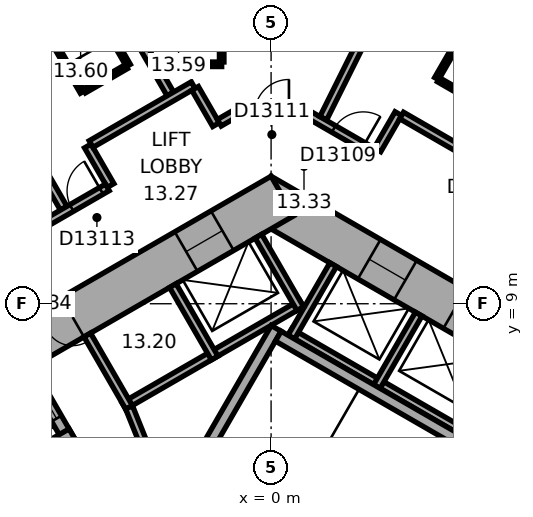
"""IFC4 building model, lengths in metres.
Left out: names, types, materials, properties, quantities, classifications, styles, units other than length and angle.
Written with IfcOpenShell. Run it as: python <this file> out.ifc"""

import sys

from ifc_helpers import new_model, si_unit, direction, frame, frame_2d, origin, place, context, subcontext, project, spatial, rectangle, extrude, element, fill, save


model = new_model("IFC4")
c1 = context("Model", 3, precision=1e-05, world=origin(), true_north=direction((0.0, 1.0)))
c2 = subcontext(c1, "Body", "Model", "MODEL_VIEW")
j1 = project(units=[si_unit("LENGTHUNIT", "METRE"), si_unit("PLANEANGLEUNIT", "RADIAN")], contexts=[c1])
p1 = place(None, origin())
s1 = spatial("IfcSite", under=j1, at=p1, CompositionType="ELEMENT")
p2 = place(p1, origin())
s2 = spatial("IfcBuilding", under=s1, at=p2, CompositionType="ELEMENT")
p3 = place(p2, frame((0.0, 0.0, 63.8)))
s3 = spatial("IfcBuildingStorey", under=s2, at=p3, CompositionType="ELEMENT", Elevation=63.8)
p4 = place(p3, frame((10.4, 5.658, 0.0), z_axis=(0.0, 0.0, 1.0), x_axis=(-0.866021384402, 0.500006961711, 0.0)))
e1 = element("IfcWall", 1, at=p4, inside=s3, PredefinedType="SHEAR", context=c2, shape_type="SweptSolid", body=[
    extrude(rectangle(XDim=12.355, YDim=1.2, at=frame_2d((6.178, 0.0))), origin(), (0.0, 0.0, 1.0), 3.3),
])
p5 = place(p4, frame((2.728, 0.0, 0.0)))
e2 = element("IfcOpeningElement", 2, at=p5, cuts=e1, PredefinedType="OPENING", context=c2, shape_type="SweptSolid", body=[
    extrude(rectangle(XDim=1.1, YDim=2.1, at=frame_2d((0.55, 1.05))), frame((0.0, 0.61, 0.0), z_axis=(0.0, -1.0, 0.0), x_axis=(1.0, 0.0, 0.0)), (0.0, 0.0, 1.0), 1.22),
])
p6 = place(p4, frame((5.328, 0.0, 0.0)))
e3 = element("IfcOpeningElement", 3, at=p6, cuts=e1, PredefinedType="OPENING", context=c2, shape_type="SweptSolid", body=[
    extrude(rectangle(XDim=1.1, YDim=2.1, at=frame_2d((0.55, 1.05))), frame((0.0, 0.61, 0.0), z_axis=(0.0, -1.0, 0.0), x_axis=(1.0, 0.0, 0.0)), (0.0, 0.0, 1.0), 1.22),
])
p7 = place(p4, frame((7.928, 0.0, 0.0)))
e4 = element("IfcOpeningElement", 4, at=p7, cuts=e1, PredefinedType="OPENING", context=c2, shape_type="SweptSolid", body=[
    extrude(rectangle(XDim=1.1, YDim=2.1, at=frame_2d((0.55, 1.05))), frame((0.0, 0.61, 0.0), z_axis=(0.0, -1.0, 0.0), x_axis=(1.0, 0.0, 0.0)), (0.0, 0.0, 1.0), 1.22),
])
p8 = place(p3, frame((0.3, 11.836, 0.0), z_axis=(0.0, 0.0, 1.0), x_axis=(-0.866021384402, -0.500006961711, 0.0)))
e5 = element("IfcWall", 5, at=p8, inside=s3, PredefinedType="SHEAR", context=c2, shape_type="SweptSolid", body=[
    extrude(rectangle(XDim=12.355, YDim=1.2, at=frame_2d((6.178, 0.0))), origin(), (0.0, 0.0, 1.0), 3.3),
])
p9 = place(p8, frame((6.378, 0.0, 0.0)))
e6 = element("IfcOpeningElement", 6, at=p9, cuts=e5, PredefinedType="OPENING", context=c2, shape_type="SweptSolid", body=[
    extrude(rectangle(XDim=1.5, YDim=2.1, at=frame_2d((0.75, 1.05))), frame((0.0, 0.61, 0.0), z_axis=(0.0, -1.0, 0.0), x_axis=(1.0, 0.0, 0.0)), (0.0, 0.0, 1.0), 1.22),
])
p10 = place(p8, frame((1.828, 0.0, 0.0)))
e7 = element("IfcOpeningElement", 7, at=p10, cuts=e5, PredefinedType="OPENING", context=c2, shape_type="SweptSolid", body=[
    extrude(rectangle(XDim=1.1, YDim=2.1, at=frame_2d((0.55, 1.05))), frame((0.0, 0.61, 0.0), z_axis=(0.0, -1.0, 0.0), x_axis=(1.0, 0.0, 0.0)), (0.0, 0.0, 1.0), 1.22),
])
p11 = place(p3, frame((20.63, 15.47, 0.0), z_axis=(0.0, 0.0, 1.0), x_axis=(-0.894934518609, 0.446197498203, 0.0)))
e8 = element("IfcWall", 8, at=p11, inside=s3, PredefinedType="STANDARD", context=c2, shape_type="SweptSolid", body=[
    extrude(rectangle(XDim=21.246, YDim=0.2, at=frame_2d((10.623, 0.0))), origin(), (0.0, 0.0, 1.0), 3.3),
])
p12 = place(p11, frame((1.553, 0.0, 0.8)))
e9 = element("IfcOpeningElement", 9, at=p12, cuts=e8, PredefinedType="OPENING", context=c2, shape_type="SweptSolid", body=[
    extrude(rectangle(XDim=2.4, YDim=1.7, at=frame_2d((1.2, 0.85))), frame((0.0, 0.11, 0.0), z_axis=(0.0, -1.0, 0.0), x_axis=(1.0, 0.0, 0.0)), (0.0, 0.0, 1.0), 0.22),
])
p13 = place(p11, frame((5.488, 0.0, 0.8)))
e10 = element("IfcOpeningElement", 10, at=p13, cuts=e8, PredefinedType="OPENING", context=c2, shape_type="SweptSolid", body=[
    extrude(rectangle(XDim=2.4, YDim=1.7, at=frame_2d((1.2, 0.85))), frame((0.0, 0.11, 0.0), z_axis=(0.0, -1.0, 0.0), x_axis=(1.0, 0.0, 0.0)), (0.0, 0.0, 1.0), 0.22),
])
p14 = place(p11, frame((9.422, 0.0, 0.8)))
e11 = element("IfcOpeningElement", 11, at=p14, cuts=e8, PredefinedType="OPENING", context=c2, shape_type="SweptSolid", body=[
    extrude(rectangle(XDim=2.4, YDim=1.7, at=frame_2d((1.2, 0.85))), frame((0.0, 0.11, 0.0), z_axis=(0.0, -1.0, 0.0), x_axis=(1.0, 0.0, 0.0)), (0.0, 0.0, 1.0), 0.22),
])
p15 = place(p11, frame((13.357, 0.0, 0.8)))
e12 = element("IfcOpeningElement", 12, at=p15, cuts=e8, PredefinedType="OPENING", context=c2, shape_type="SweptSolid", body=[
    extrude(rectangle(XDim=2.4, YDim=1.7, at=frame_2d((1.2, 0.85))), frame((0.0, 0.11, 0.0), z_axis=(0.0, -1.0, 0.0), x_axis=(1.0, 0.0, 0.0)), (0.0, 0.0, 1.0), 0.22),
])
p16 = place(p11, frame((17.292, 0.0, 0.8)))
e13 = element("IfcOpeningElement", 13, at=p16, cuts=e8, PredefinedType="OPENING", context=c2, shape_type="SweptSolid", body=[
    extrude(rectangle(XDim=2.4, YDim=1.7, at=frame_2d((1.2, 0.85))), frame((0.0, 0.11, 0.0), z_axis=(0.0, -1.0, 0.0), x_axis=(1.0, 0.0, 0.0)), (0.0, 0.0, 1.0), 0.22),
])
p17 = place(p3, frame((-3.136, 24.805, 0.0), z_axis=(0.0, 0.0, 1.0), x_axis=(-0.866028291626, -0.499994998079, 0.0)))
e14 = element("IfcWall", 14, at=p17, inside=s3, PredefinedType="STANDARD", context=c2, shape_type="SweptSolid", body=[
    extrude(rectangle(XDim=21.246, YDim=0.2, at=frame_2d((10.623, 0.0))), origin(), (0.0, 0.0, 1.0), 3.3),
])
p18 = place(p17, frame((1.555, 0.0, 0.8)))
e15 = element("IfcOpeningElement", 15, at=p18, cuts=e14, PredefinedType="OPENING", context=c2, shape_type="SweptSolid", body=[
    extrude(rectangle(XDim=2.4, YDim=1.7, at=frame_2d((1.2, 0.85))), frame((0.0, 0.11, 0.0), z_axis=(0.0, -1.0, 0.0), x_axis=(1.0, 0.0, 0.0)), (0.0, 0.0, 1.0), 0.22),
])
p19 = place(p17, frame((5.489, 0.0, 0.8)))
e16 = element("IfcOpeningElement", 16, at=p19, cuts=e14, PredefinedType="OPENING", context=c2, shape_type="SweptSolid", body=[
    extrude(rectangle(XDim=2.4, YDim=1.7, at=frame_2d((1.2, 0.85))), frame((0.0, 0.11, 0.0), z_axis=(0.0, -1.0, 0.0), x_axis=(1.0, 0.0, 0.0)), (0.0, 0.0, 1.0), 0.22),
])
p20 = place(p17, frame((9.424, 0.0, 0.8)))
e17 = element("IfcOpeningElement", 17, at=p20, cuts=e14, PredefinedType="OPENING", context=c2, shape_type="SweptSolid", body=[
    extrude(rectangle(XDim=2.4, YDim=1.7, at=frame_2d((1.2, 0.85))), frame((0.0, 0.11, 0.0), z_axis=(0.0, -1.0, 0.0), x_axis=(1.0, 0.0, 0.0)), (0.0, 0.0, 1.0), 0.22),
])
p21 = place(p17, frame((13.358, 0.0, 0.8)))
e18 = element("IfcOpeningElement", 18, at=p21, cuts=e14, PredefinedType="OPENING", context=c2, shape_type="SweptSolid", body=[
    extrude(rectangle(XDim=2.4, YDim=1.7, at=frame_2d((1.2, 0.85))), frame((0.0, 0.11, 0.0), z_axis=(0.0, -1.0, 0.0), x_axis=(1.0, 0.0, 0.0)), (0.0, 0.0, 1.0), 0.22),
])
p22 = place(p17, frame((17.293, 0.0, 0.8)))
e19 = element("IfcOpeningElement", 19, at=p22, cuts=e14, PredefinedType="OPENING", context=c2, shape_type="SweptSolid", body=[
    extrude(rectangle(XDim=2.4, YDim=1.7, at=frame_2d((1.2, 0.85))), frame((0.0, 0.11, 0.0), z_axis=(0.0, -1.0, 0.0), x_axis=(1.0, 0.0, 0.0)), (0.0, 0.0, 1.0), 0.22),
])
p23 = place(p3, frame((7.424, 4.259, 0.0), z_axis=(0.0, 0.0, 1.0), x_axis=(-0.866026010844, 0.49999894854, 0.0)))
e20 = element("IfcWall", 20, at=p23, inside=s3, PredefinedType="PARTITIONING", context=c2, shape_type="SweptSolid", body=[
    extrude(rectangle(XDim=8.0, YDim=0.2, at=frame_2d((4.0, 0.0))), origin(), (0.0, 0.0, 1.0), 3.05),
])
for number, where, z_axis, x_axis in (
    (21, (2.784, 6.822, 0.0), (0.0, 0.0, 1.0), (0.5, 0.866, 0.0)),
    (22, (0.532, 8.122, 0.0), (0.0, 0.0, 1.0), (0.5, 0.866, 0.0)),
):
    element("IfcWall", number, at=place(p3, frame(where, z_axis=z_axis, x_axis=x_axis)), inside=s3, PredefinedType="PARTITIONING", context=c2, shape_type="SweptSolid", body=[
        extrude(rectangle(XDim=2.2, YDim=0.2, at=frame_2d((1.1, 0.0))), origin(), (0.0, 0.0, 1.0), 3.05),
    ])
p24 = place(p3, frame((0.803, 9.009, 0.0), z_axis=(0.0, 0.0, 1.0), x_axis=(-0.866028230842, -0.499995103361, 0.0)))
e23 = element("IfcWall", 23, at=p24, inside=s3, PredefinedType="PARTITIONING", context=c2, shape_type="SweptSolid", body=[
    extrude(rectangle(XDim=5.4, YDim=0.2, at=frame_2d((2.7, 0.0))), origin(), (0.0, 0.0, 1.0), 3.05),
])
p25 = place(p3, frame((0.767, 8.872, 0.0), z_axis=(0.0, 0.0, 1.0), x_axis=(-0.499994660107, 0.866028486751, 0.0)))
e24 = element("IfcWall", 24, at=p25, inside=s3, PredefinedType="PARTITIONING", context=c2, shape_type="SweptSolid", body=[
    extrude(rectangle(XDim=2.2, YDim=0.2, at=frame_2d((1.1, 0.0))), origin(), (0.0, 0.0, 1.0), 3.05),
])
for number, where, z_axis, x_axis in (
    (25, (-1.485, 7.572, 0.0), (0.0, 0.0, 1.0), (-0.5, 0.866, 0.0)),
    (26, (-3.737, 6.272, 0.0), (0.0, 0.0, 1.0), (-0.5, 0.866, 0.0)),
):
    element("IfcWall", number, at=place(p3, frame(where, z_axis=z_axis, x_axis=x_axis)), inside=s3, PredefinedType="PARTITIONING", context=c2, shape_type="SweptSolid", body=[
        extrude(rectangle(XDim=2.2, YDim=0.2, at=frame_2d((1.1, 0.0))), origin(), (0.0, 0.0, 1.0), 3.05),
    ])
p26 = place(p3, frame((-2.216, 4.282, 0.0), z_axis=(0.0, 0.0, 1.0), x_axis=(0.499977259774, 0.866038532462, 0.0)))
e27 = element("IfcWall", 27, at=p26, inside=s3, PredefinedType="SHEAR", context=c2, shape_type="SweptSolid", body=[
    extrude(rectangle(XDim=4.7, YDim=0.3, at=frame_2d((2.35, 0.0))), origin(), (0.0, 0.0, 1.0), 3.05),
])
p27 = place(p3, frame((6.303, 4.617, 0.0), z_axis=(0.0, 0.0, 1.0), x_axis=(-0.866027801685, 0.499995846692, 0.0)))
e28 = element("IfcWall", 28, at=p27, inside=s3, PredefinedType="SHEAR", context=c2, shape_type="SweptSolid", body=[
    extrude(rectangle(XDim=7.06, YDim=0.3, at=frame_2d((3.53, 0.0))), origin(), (0.0, 0.0, 1.0), 3.05),
])
p28 = place(p3, frame((-5.295, 5.372, 0.0), z_axis=(0.0, 0.0, 1.0), x_axis=(-0.500077893725, 0.86598042715, 0.0)))
e29 = element("IfcWall", 29, at=p28, inside=s3, PredefinedType="SHEAR", context=c2, shape_type="SweptSolid", body=[
    extrude(rectangle(XDim=2.2, YDim=0.3, at=frame_2d((1.1, 0.0))), origin(), (0.0, 0.0, 1.0), 3.05),
])
p29 = place(p28, frame((0.7, 0.0, 0.0)))
e30 = element("IfcOpeningElement", 30, at=p29, cuts=e29, PredefinedType="OPENING", context=c2, shape_type="SweptSolid", body=[
    extrude(rectangle(XDim=1.1, YDim=2.1, at=frame_2d((0.55, 1.05))), frame((0.0, 0.16, 0.0), z_axis=(0.0, -1.0, 0.0), x_axis=(1.0, 0.0, 0.0)), (0.0, 0.0, 1.0), 0.32),
])
p30 = place(p3, frame((-5.24, 5.577, 0.0), z_axis=(0.0, 0.0, 1.0), x_axis=(-0.866014461049, -0.500018952895, 0.0)))
e31 = element("IfcWall", 31, at=p30, inside=s3, PredefinedType="SHEAR", context=c2, shape_type="SweptSolid", body=[
    extrude(rectangle(XDim=3.35, YDim=0.3, at=frame_2d((1.675, 0.0))), origin(), (0.0, 0.0, 1.0), 3.05),
])
p31 = place(p3, frame((-2.615, 3.487, 0.0), z_axis=(0.0, 0.0, 1.0), x_axis=(-0.373576831041, 0.92759924068, 0.0)))
e32 = element("IfcWall", 32, at=p31, inside=s3, PredefinedType="PARTITIONING", context=c2, shape_type="SweptSolid", body=[
    extrude(rectangle(XDim=3.002, YDim=0.2, at=frame_2d((1.501, 0.0))), origin(), (0.0, 0.0, 1.0), 3.05),
])
p32 = place(p31, frame((1.15, 0.0, 0.0)))
e33 = element("IfcOpeningElement", 33, at=p32, cuts=e32, PredefinedType="OPENING", context=c2, shape_type="SweptSolid", body=[
    extrude(rectangle(XDim=0.9, YDim=2.1, at=frame_2d((0.45, 1.05))), frame((0.0, 0.11, 0.0), z_axis=(0.0, -1.0, 0.0), x_axis=(1.0, 0.0, 0.0)), (0.0, 0.0, 1.0), 0.22),
])
p33 = place(p3, frame((-10.083, 19.524, 0.0), z_axis=(0.0, 0.0, 1.0), x_axis=(0.499999662836, -0.866025598446, 0.0)))
e34 = element("IfcWall", 34, at=p33, inside=s3, PredefinedType="PARTITIONING", context=c2, shape_type="SweptSolid", body=[
    extrude(rectangle(XDim=9.25, YDim=0.2, at=frame_2d((4.625, 0.0))), origin(), (0.0, 0.0, 1.0), 2.6),
])
p34 = place(p3, frame((-6.676, 21.492, 0.0), z_axis=(0.0, 0.0, 1.0), x_axis=(0.500011263043, -0.866018900966, 0.0)))
e35 = element("IfcWall", 35, at=p34, inside=s3, PredefinedType="PARTITIONING", context=c2, shape_type="SweptSolid", body=[
    extrude(rectangle(XDim=8.049, YDim=0.2, at=frame_2d((4.024, 0.0))), origin(), (0.0, 0.0, 1.0), 3.05),
])
p35 = place(p3, frame((-5.026, 17.469, 0.0), z_axis=(0.0, 0.0, 1.0), x_axis=(0.500005339912, -0.866022320763, 0.0)))
e36 = element("IfcWall", 36, at=p35, inside=s3, PredefinedType="PARTITIONING", context=c2, shape_type="SweptSolid", body=[
    extrude(rectangle(XDim=2.54, YDim=0.12, at=frame_2d((1.27, 0.0))), origin(), (0.0, 0.0, 1.0), 3.05),
])
p36 = place(p3, frame((-4.968, 14.569, 0.0), z_axis=(0.0, 0.0, 1.0), x_axis=(-0.500046963369, 0.865998287773, 0.0)))
e37 = element("IfcWall", 37, at=p36, inside=s3, PredefinedType="PARTITIONING", context=c2, shape_type="SweptSolid", body=[
    extrude(rectangle(XDim=2.54, YDim=0.12, at=frame_2d((1.27, 0.0))), origin(), (0.0, 0.0, 1.0), 3.05),
])
p37 = place(p36, frame((0.82, 0.0, 0.0)))
e38 = element("IfcOpeningElement", 38, at=p37, cuts=e37, PredefinedType="OPENING", context=c2, shape_type="SweptSolid", body=[
    extrude(rectangle(XDim=0.9, YDim=2.1, at=frame_2d((0.45, 1.05))), frame((0.0, 0.07, 0.0), z_axis=(0.0, -1.0, 0.0), x_axis=(1.0, 0.0, 0.0)), (0.0, 0.0, 1.0), 0.14),
])
p38 = place(p3, frame((-4.823, 13.152, 0.0), z_axis=(0.0, 0.0, 1.0), x_axis=(0.499986357472, -0.866033280158, 0.0)))
e39 = element("IfcWall", 39, at=p38, inside=s3, PredefinedType="PARTITIONING", context=c2, shape_type="SweptSolid", body=[
    extrude(rectangle(XDim=1.201, YDim=0.2, at=frame_2d((0.601, 0.0))), origin(), (0.0, 0.0, 1.0), 3.05),
])
p39 = place(p3, frame((-4.309, 12.061, 0.0), z_axis=(0.0, 0.0, 1.0), x_axis=(-0.866020679205, -0.500008183122, 0.0)))
e40 = element("IfcWall", 40, at=p39, inside=s3, PredefinedType="PARTITIONING", context=c2, shape_type="SweptSolid", body=[
    extrude(rectangle(XDim=5.104, YDim=0.2, at=frame_2d((2.552, 0.0))), origin(), (0.0, 0.0, 1.0), 3.05),
])
p40 = place(p39, frame((0.185, 0.0, 0.0)))
e41 = element("IfcOpeningElement", 41, at=p40, cuts=e40, PredefinedType="OPENING", context=c2, shape_type="SweptSolid", body=[
    extrude(rectangle(XDim=0.9, YDim=2.1, at=frame_2d((0.45, 1.05))), frame((0.0, 0.11, 0.0), z_axis=(0.0, -1.0, 0.0), x_axis=(1.0, 0.0, 0.0)), (0.0, 0.0, 1.0), 0.22),
])
p41 = place(p39, frame((2.736, 0.0, 0.0)))
e42 = element("IfcOpeningElement", 42, at=p41, cuts=e40, PredefinedType="OPENING", context=c2, shape_type="SweptSolid", body=[
    extrude(rectangle(XDim=0.9, YDim=2.1, at=frame_2d((0.45, 1.05))), frame((0.0, 0.11, 0.0), z_axis=(0.0, -1.0, 0.0), x_axis=(1.0, 0.0, 0.0)), (0.0, 0.0, 1.0), 0.22),
])
p42 = place(p3, frame((-3.808, 15.239, 0.0), z_axis=(0.0, 0.0, 1.0), x_axis=(-0.866087136806, -0.499893060024, 0.0)))
e43 = element("IfcWall", 43, at=p42, inside=s3, PredefinedType="PARTITIONING", context=c2, shape_type="SweptSolid", body=[
    extrude(rectangle(XDim=1.28, YDim=0.12, at=frame_2d((0.64, 0.0))), origin(), (0.0, 0.0, 1.0), 3.05),
])
p43 = place(p3, frame((-2.05, 14.752, 0.0), z_axis=(0.0, 0.0, 1.0), x_axis=(-0.866030936828, -0.499990416364, 0.0)))
e44 = element("IfcWall", 44, at=p43, inside=s3, PredefinedType="PARTITIONING", context=c2, shape_type="SweptSolid", body=[
    extrude(rectangle(XDim=3.102, YDim=0.2, at=frame_2d((1.551, 0.0))), origin(), (0.0, 0.0, 1.0), 3.05),
])
p44 = place(p3, frame((-1.449, 13.712, 0.0), z_axis=(0.0, 0.0, 1.0), x_axis=(-0.499978356969, 0.866037899034, 0.0)))
e45 = element("IfcWall", 45, at=p44, inside=s3, PredefinedType="PARTITIONING", context=c2, shape_type="SweptSolid", body=[
    extrude(rectangle(XDim=1.101, YDim=0.2, at=frame_2d((0.551, 0.0))), origin(), (0.0, 0.0, 1.0), 3.05),
])
p45 = place(p3, frame((-1.3, 15.301, 0.0), z_axis=(0.0, 0.0, 1.0), x_axis=(-1.0, 0.0, 0.0)))
e46 = element("IfcWall", 46, at=p45, inside=s3, PredefinedType="PARTITIONING", context=c2, shape_type="SweptSolid", body=[
    extrude(rectangle(XDim=1.661, YDim=0.12, at=frame_2d((0.831, 0.0))), origin(), (0.0, 0.0, 1.0), 3.05),
])
p46 = place(p3, frame((-1.3, 18.341, 0.0), z_axis=(0.0, 0.0, 1.0), x_axis=(0.0, -1.0, 0.0)))
e47 = element("IfcWall", 47, at=p46, inside=s3, PredefinedType="PARTITIONING", context=c2, shape_type="SweptSolid", body=[
    extrude(rectangle(XDim=2.98, YDim=0.12, at=frame_2d((1.49, 0.0))), origin(), (0.0, 0.0, 1.0), 3.05),
])
p47 = place(p46, frame((1.04, 0.0, 0.0)))
e48 = element("IfcOpeningElement", 48, at=p47, cuts=e47, PredefinedType="OPENING", context=c2, shape_type="SweptSolid", body=[
    extrude(rectangle(XDim=0.9, YDim=2.1, at=frame_2d((0.45, 1.05))), frame((0.0, 0.07, 0.0), z_axis=(0.0, -1.0, 0.0), x_axis=(1.0, 0.0, 0.0)), (0.0, 0.0, 1.0), 0.14),
])
p48 = place(p3, frame((-0.95, 14.001, 0.0), z_axis=(0.0, 0.0, 1.0), x_axis=(-0.86609177584, -0.499885022602, 0.0)))
e49 = element("IfcWall", 49, at=p48, inside=s3, PredefinedType="PARTITIONING", context=c2, shape_type="SweptSolid", body=[
    extrude(rectangle(XDim=0.477, YDim=0.2, at=frame_2d((0.238, 0.0))), origin(), (0.0, 0.0, 1.0), 3.05),
])
p49 = place(p3, frame((0.95, 14.001, 0.0), z_axis=(0.0, 0.0, 1.0), x_axis=(-1.0, 0.0, 0.0)))
e50 = element("IfcWall", 50, at=p49, inside=s3, PredefinedType="PARTITIONING", context=c2, shape_type="SweptSolid", body=[
    extrude(rectangle(XDim=1.86, YDim=0.2, at=frame_2d((0.93, 0.0))), origin(), (0.0, 0.0, 1.0), 3.05),
])
p50 = place(p49, frame((0.48, 0.0, 0.0)))
e51 = element("IfcOpeningElement", 51, at=p50, cuts=e50, PredefinedType="OPENING", context=c2, shape_type="SweptSolid", body=[
    extrude(rectangle(XDim=0.9, YDim=2.1, at=frame_2d((0.45, 1.05))), frame((0.0, 0.11, 0.0), z_axis=(0.0, -1.0, 0.0), x_axis=(1.0, 0.0, 0.0)), (0.0, 0.0, 1.0), 0.22),
])
p51 = place(p3, frame((2.748, 12.962, 0.0), z_axis=(0.0, 0.0, 1.0), x_axis=(-0.866013897511, 0.50001992892, 0.0)))
e52 = element("IfcWall", 52, at=p51, inside=s3, PredefinedType="PARTITIONING", context=c2, shape_type="SweptSolid", body=[
    extrude(rectangle(XDim=2.037, YDim=0.2, at=frame_2d((1.018, 0.0))), origin(), (0.0, 0.0, 1.0), 3.05),
])
p52 = place(p51, frame((0.372, 0.0, 0.0)))
e53 = element("IfcOpeningElement", 53, at=p52, cuts=e52, PredefinedType="OPENING", context=c2, shape_type="SweptSolid", body=[
    extrude(rectangle(XDim=0.9, YDim=2.1, at=frame_2d((0.45, 1.05))), frame((0.0, 0.11, 0.0), z_axis=(0.0, -1.0, 0.0), x_axis=(1.0, 0.0, 0.0)), (0.0, 0.0, 1.0), 0.22),
])
p53 = place(p3, frame((3.349, 14.002, 0.0), z_axis=(0.0, 0.0, 1.0), x_axis=(-0.500074377092, -0.865982457891, 0.0)))
e54 = element("IfcWall", 54, at=p53, inside=s3, PredefinedType="PARTITIONING", context=c2, shape_type="SweptSolid", body=[
    extrude(rectangle(XDim=1.101, YDim=0.2, at=frame_2d((0.55, 0.0))), origin(), (0.0, 0.0, 1.0), 3.05),
])
p54 = place(p3, frame((4.356, 14.922, 0.0), z_axis=(0.0, 0.0, 1.0), x_axis=(0.499936506574, 0.866062058628, 0.0)))
e55 = element("IfcWall", 55, at=p54, inside=s3, PredefinedType="PARTITIONING", context=c2, shape_type="SweptSolid", body=[
    extrude(rectangle(XDim=2.6, YDim=0.12, at=frame_2d((1.3, 0.0))), origin(), (0.0, 0.0, 1.0), 3.05),
])
p55 = place(p54, frame((0.85, 0.0, 0.0)))
e56 = element("IfcOpeningElement", 56, at=p55, cuts=e55, PredefinedType="OPENING", context=c2, shape_type="SweptSolid", body=[
    extrude(rectangle(XDim=0.9, YDim=2.1, at=frame_2d((0.45, 1.05))), frame((0.0, 0.07, 0.0), z_axis=(0.0, -1.0, 0.0), x_axis=(1.0, 0.0, 0.0)), (0.0, 0.0, 1.0), 0.14),
])
p56 = place(p3, frame((5.351, 21.859, 0.0), z_axis=(0.0, 0.0, 1.0), x_axis=(-0.446205309328, -0.894930624086, 0.0)))
e57 = element("IfcWall", 57, at=p56, inside=s3, PredefinedType="PARTITIONING", context=c2, shape_type="SweptSolid", body=[
    extrude(rectangle(XDim=8.913, YDim=0.2, at=frame_2d((4.457, 0.0))), origin(), (0.0, 0.0, 1.0), 2.6),
])
p57 = place(p3, frame((5.569, 14.222, 0.0), z_axis=(0.0, 0.0, 1.0), x_axis=(-0.866036909293, 0.499980071345, 0.0)))
e58 = element("IfcWall", 58, at=p57, inside=s3, PredefinedType="PARTITIONING", context=c2, shape_type="SweptSolid", body=[
    extrude(rectangle(XDim=1.34, YDim=0.12, at=frame_2d((0.67, 0.0))), origin(), (0.0, 0.0, 1.0), 3.05),
])
p58 = place(p3, frame((10.885, 9.652, 0.0), z_axis=(0.0, 0.0, 1.0), x_axis=(-0.866033868542, 0.499985338323, 0.0)))
e59 = element("IfcWall", 59, at=p58, inside=s3, PredefinedType="PARTITIONING", context=c2, shape_type="SweptSolid", body=[
    extrude(rectangle(XDim=8.602, YDim=0.2, at=frame_2d((4.301, 0.0))), origin(), (0.0, 0.0, 1.0), 3.05),
])
p59 = place(p58, frame((5.302, 0.0, 0.0)))
e60 = element("IfcOpeningElement", 60, at=p59, cuts=e59, PredefinedType="OPENING", context=c2, shape_type="SweptSolid", body=[
    extrude(rectangle(XDim=0.9, YDim=2.1, at=frame_2d((0.45, 1.05))), frame((0.0, 0.11, 0.0), z_axis=(0.0, -1.0, 0.0), x_axis=(1.0, 0.0, 0.0)), (0.0, 0.0, 1.0), 0.22),
])
p60 = place(p9, origin())
e61 = element("IfcDoor", 61, at=p60, inside=s3, OperationType="DOUBLE_DOOR_SINGLE_SWING", PredefinedType="DOOR", context=c2, shape_type="SweptSolid", body=[
    extrude(rectangle(XDim=1.5, YDim=2.1, at=frame_2d((0.75, 1.05))), frame((0.0, 0.025, 0.0), z_axis=(0.0, -1.0, 0.0), x_axis=(1.0, 0.0, 0.0)), (0.0, 0.0, 1.0), 0.05),
])
fill(e6, e61)
p61 = place(p29, origin())
e62 = element("IfcDoor", 62, at=p61, inside=s3, OperationType="DOUBLE_DOOR_SLIDING", PredefinedType="DOOR", context=c2, shape_type="SweptSolid", body=[
    extrude(rectangle(XDim=1.1, YDim=2.1, at=frame_2d((0.55, 1.05))), frame((0.0, 0.025, 0.0), z_axis=(0.0, -1.0, 0.0), x_axis=(1.0, 0.0, 0.0)), (0.0, 0.0, 1.0), 0.05),
])
fill(e30, e62)
p62 = place(p7, origin())
e63 = element("IfcDoor", 63, at=p62, inside=s3, OperationType="DOUBLE_DOOR_SLIDING", PredefinedType="DOOR", context=c2, shape_type="SweptSolid", body=[
    extrude(rectangle(XDim=1.1, YDim=2.1, at=frame_2d((0.55, 1.05))), frame((0.0, 0.025, 0.0), z_axis=(0.0, -1.0, 0.0), x_axis=(1.0, 0.0, 0.0)), (0.0, 0.0, 1.0), 0.05),
])
fill(e4, e63)
p63 = place(p10, origin())
e64 = element("IfcDoor", 64, at=p63, inside=s3, OperationType="DOUBLE_DOOR_SLIDING", PredefinedType="DOOR", context=c2, shape_type="SweptSolid", body=[
    extrude(rectangle(XDim=1.1, YDim=2.1, at=frame_2d((0.55, 1.05))), frame((0.0, 0.025, 0.0), z_axis=(0.0, -1.0, 0.0), x_axis=(1.0, 0.0, 0.0)), (0.0, 0.0, 1.0), 0.05),
])
fill(e7, e64)
p64 = place(p52, origin())
e65 = element("IfcDoor", 65, at=p64, inside=s3, OperationType="SINGLE_SWING_LEFT", PredefinedType="DOOR", context=c2, shape_type="SweptSolid", body=[
    extrude(rectangle(XDim=0.9, YDim=2.1, at=frame_2d((0.45, 1.05))), frame((0.0, 0.025, 0.0), z_axis=(0.0, -1.0, 0.0), x_axis=(1.0, 0.0, 0.0)), (0.0, 0.0, 1.0), 0.05),
])
fill(e53, e65)
p65 = place(p50, origin())
e66 = element("IfcDoor", 66, at=p65, inside=s3, OperationType="SINGLE_SWING_LEFT", PredefinedType="DOOR", context=c2, shape_type="SweptSolid", body=[
    extrude(rectangle(XDim=0.9, YDim=2.1, at=frame_2d((0.45, 1.05))), frame((0.0, 0.025, 0.0), z_axis=(0.0, -1.0, 0.0), x_axis=(1.0, 0.0, 0.0)), (0.0, 0.0, 1.0), 0.05),
])
fill(e51, e66)
p66 = place(p40, origin())
e67 = element("IfcDoor", 67, at=p66, inside=s3, OperationType="SINGLE_SWING_LEFT", PredefinedType="DOOR", context=c2, shape_type="SweptSolid", body=[
    extrude(rectangle(XDim=0.9, YDim=2.1, at=frame_2d((0.45, 1.05))), frame((0.0, 0.025, 0.0), z_axis=(0.0, -1.0, 0.0), x_axis=(1.0, 0.0, 0.0)), (0.0, 0.0, 1.0), 0.05),
])
fill(e41, e67)
p67 = place(p37, origin())
e68 = element("IfcDoor", 68, at=p67, inside=s3, OperationType="SINGLE_SWING_LEFT", PredefinedType="DOOR", context=c2, shape_type="SweptSolid", body=[
    extrude(rectangle(XDim=0.9, YDim=2.1, at=frame_2d((0.45, 1.05))), frame((0.0, 0.025, 0.0), z_axis=(0.0, -1.0, 0.0), x_axis=(1.0, 0.0, 0.0)), (0.0, 0.0, 1.0), 0.05),
])
fill(e38, e68)
save(model, sys.argv[1])
